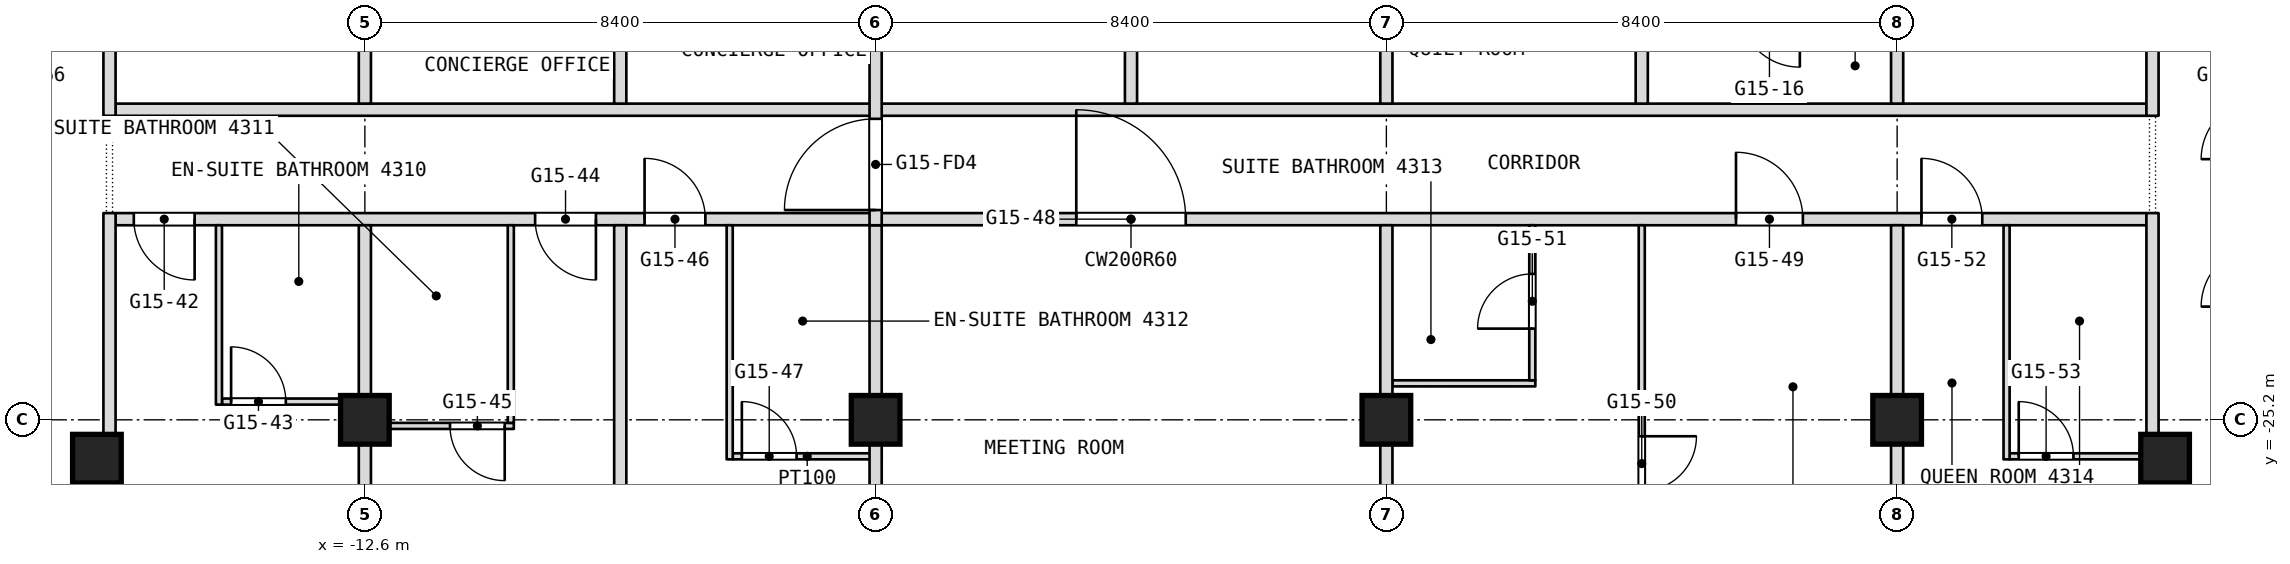
"""IFC4 building model, lengths in metres.
Left out: names, types, materials, properties, quantities, classifications, styles, units other than length and angle.
Written with IfcOpenShell. Run it as: python <this file> out.ifc"""

import sys

from ifc_helpers import new_model, si_unit, direction, frame, frame_2d, origin, origin_2d, place, context, subcontext, project, spatial, rectangle, extrude, element, fill, save


model = new_model("IFC4")
c1 = context("Model", 3, precision=1e-05, world=origin(), true_north=direction((0.0, 1.0)))
c2 = subcontext(c1, "Body", "Model", "MODEL_VIEW")
j1 = project(units=[si_unit("LENGTHUNIT", "METRE"), si_unit("PLANEANGLEUNIT", "RADIAN")], contexts=[c1])
p1 = place(None, origin())
s1 = spatial("IfcSite", under=j1, at=p1, CompositionType="ELEMENT")
p2 = place(p1, origin())
s2 = spatial("IfcBuilding", under=s1, at=p2, CompositionType="ELEMENT")
p3 = place(p2, frame((0.0, 0.0, 191.3)))
s3 = spatial("IfcBuildingStorey", under=s2, at=p3, CompositionType="ELEMENT", Elevation=191.3)
for number, where, z_axis, x_axis in (
    (1, (-12.6, -25.2, 0.0), (0.0, 0.0, 1.0), (1.0, 0.0, 0.0)),
    (2, (-4.2, -25.2, 0.0), (0.0, 0.0, 1.0), (1.0, 0.0, 0.0)),
    (3, (4.2, -25.2, 0.0), (0.0, 0.0, 1.0), (1.0, 0.0, 0.0)),
    (4, (12.6, -25.2, 0.0), (0.0, 0.0, 1.0), (1.0, 0.0, 0.0)),
    (5, (17.007, -25.839, 0.0), (0.0, 0.0, 1.0), (1.0, 0.0, 0.0)),
    (6, (-17.007, -25.839, 0.0), (0.0, 0.0, 1.0), (1.0, 0.0, 0.0)),
):
    element("IfcColumn", number, at=place(p3, frame(where, z_axis=z_axis, x_axis=x_axis)), inside=s3, PredefinedType="COLUMN", context=c2, shape_type="SweptSolid", body=[
        extrude(rectangle(XDim=0.8, YDim=0.8, at=origin_2d()), origin(), (0.0, 0.0, 1.0), 3.6),
    ])
p4 = place(p3, frame((-6.55, -25.8, 0.0), z_axis=(0.0, 0.0, 1.0), x_axis=(1.0, 0.0, 0.0)))
e7 = element("IfcWall", 7, at=p4, inside=s3, PredefinedType="PARTITIONING", context=c2, shape_type="SweptSolid", body=[
    extrude(rectangle(XDim=2.45, YDim=0.1, at=frame_2d((1.225, 0.0))), origin(), (0.0, 0.0, 1.0), 3.34),
])
p5 = place(p4, frame((0.15, 0.0, 0.0)))
e8 = element("IfcOpeningElement", 8, at=p5, cuts=e7, PredefinedType="OPENING", context=c2, shape_type="SweptSolid", body=[
    extrude(rectangle(XDim=0.9, YDim=2.1, at=frame_2d((0.45, 1.05))), frame((0.0, 0.05, 0.0), z_axis=(0.0, -1.0, 0.0), x_axis=(1.0, 0.0, 0.0)), (0.0, 0.0, 1.0), 0.1),
])
p6 = place(p3, frame((14.45, -25.8, 0.0), z_axis=(0.0, 0.0, 1.0), x_axis=(1.0, 0.0, 0.0)))
e9 = element("IfcWall", 9, at=p6, inside=s3, PredefinedType="PARTITIONING", context=c2, shape_type="SweptSolid", body=[
    extrude(rectangle(XDim=2.25, YDim=0.1, at=frame_2d((1.125, 0.0))), origin(), (0.0, 0.0, 1.0), 3.34),
])
p7 = place(p6, frame((0.15, 0.0, 0.0)))
e10 = element("IfcOpeningElement", 10, at=p7, cuts=e9, PredefinedType="OPENING", context=c2, shape_type="SweptSolid", body=[
    extrude(rectangle(XDim=0.9, YDim=2.1, at=frame_2d((0.45, 1.05))), frame((0.0, 0.05, 0.0), z_axis=(0.0, -1.0, 0.0), x_axis=(1.0, 0.0, 0.0)), (0.0, 0.0, 1.0), 0.1),
])
p8 = place(p3, frame((-12.5, -25.3, 0.0), z_axis=(0.0, 0.0, 1.0), x_axis=(1.0, 0.0, 0.0)))
e11 = element("IfcWall", 11, at=p8, inside=s3, PredefinedType="PARTITIONING", context=c2, shape_type="SweptSolid", body=[
    extrude(rectangle(XDim=2.35, YDim=0.1, at=frame_2d((1.175, 0.0))), origin(), (0.0, 0.0, 1.0), 2.94),
])
p9 = place(p8, frame((1.3, 0.0, 0.0)))
e12 = element("IfcOpeningElement", 12, at=p9, cuts=e11, PredefinedType="OPENING", context=c2, shape_type="SweptSolid", body=[
    extrude(rectangle(XDim=0.9, YDim=2.1, at=frame_2d((0.45, 1.05))), frame((0.0, 0.05, 0.0), z_axis=(0.0, -1.0, 0.0), x_axis=(1.0, 0.0, 0.0)), (0.0, 0.0, 1.0), 0.1),
])
p10 = place(p3, frame((-14.95, -24.9, 0.0), z_axis=(0.0, 0.0, 1.0), x_axis=(1.0, 0.0, 0.0)))
e13 = element("IfcWall", 13, at=p10, inside=s3, PredefinedType="PARTITIONING", context=c2, shape_type="SweptSolid", body=[
    extrude(rectangle(XDim=2.45, YDim=0.1, at=frame_2d((1.225, 0.0))), origin(), (0.0, 0.0, 1.0), 3.34),
])
p11 = place(p10, frame((0.15, 0.0, 0.0)))
e14 = element("IfcOpeningElement", 14, at=p11, cuts=e13, PredefinedType="OPENING", context=c2, shape_type="SweptSolid", body=[
    extrude(rectangle(XDim=0.9, YDim=2.1, at=frame_2d((0.45, 1.05))), frame((0.0, 0.05, 0.0), z_axis=(0.0, -1.0, 0.0), x_axis=(1.0, 0.0, 0.0)), (0.0, 0.0, 1.0), 0.1),
])
p12 = place(p3, frame((4.3, -24.6, 0.0), z_axis=(0.0, 0.0, 1.0), x_axis=(1.0, 0.0, 0.0)))
e15 = element("IfcWall", 15, at=p12, inside=s3, PredefinedType="PARTITIONING", context=c2, shape_type="SweptSolid", body=[
    extrude(rectangle(XDim=2.35, YDim=0.1, at=frame_2d((1.175, 0.0))), origin(), (0.0, 0.0, 1.0), 3.34),
])
p13 = place(p3, frame((-16.7, -21.9, 0.0), z_axis=(0.0, 0.0, 1.0), x_axis=(1.0, 0.0, 0.0)))
e16 = element("IfcWall", 16, at=p13, inside=s3, PredefinedType="PARTITIONING", context=c2, shape_type="SweptSolid", body=[
    extrude(rectangle(XDim=33.4, YDim=0.2, at=frame_2d((16.7, 0.0))), origin(), (0.0, 0.0, 1.0), 3.34),
])
p14 = place(p13, frame((0.3, 0.0, 0.0)))
e17 = element("IfcOpeningElement", 17, at=p14, cuts=e16, PredefinedType="OPENING", context=c2, shape_type="SweptSolid", body=[
    extrude(rectangle(XDim=1.0, YDim=2.1, at=frame_2d((0.5, 1.05))), frame((0.0, 0.1, 0.0), z_axis=(0.0, -1.0, 0.0), x_axis=(1.0, 0.0, 0.0)), (0.0, 0.0, 1.0), 0.2),
])
p15 = place(p13, frame((6.9, 0.0, 0.0)))
e18 = element("IfcOpeningElement", 18, at=p15, cuts=e16, PredefinedType="OPENING", context=c2, shape_type="SweptSolid", body=[
    extrude(rectangle(XDim=1.0, YDim=2.1, at=frame_2d((0.5, 1.05))), frame((0.0, 0.1, 0.0), z_axis=(0.0, -1.0, 0.0), x_axis=(1.0, 0.0, 0.0)), (0.0, 0.0, 1.0), 0.2),
])
p16 = place(p13, frame((8.7, 0.0, 0.0)))
e19 = element("IfcOpeningElement", 19, at=p16, cuts=e16, PredefinedType="OPENING", context=c2, shape_type="SweptSolid", body=[
    extrude(rectangle(XDim=1.0, YDim=2.1, at=frame_2d((0.5, 1.05))), frame((0.0, 0.1, 0.0), z_axis=(0.0, -1.0, 0.0), x_axis=(1.0, 0.0, 0.0)), (0.0, 0.0, 1.0), 0.2),
])
p17 = place(p13, frame((15.8, 0.0, 0.0)))
e20 = element("IfcOpeningElement", 20, at=p17, cuts=e16, PredefinedType="OPENING", context=c2, shape_type="SweptSolid", body=[
    extrude(rectangle(XDim=1.8, YDim=2.1, at=frame_2d((0.9, 1.05))), frame((0.0, 0.1, 0.0), z_axis=(0.0, -1.0, 0.0), x_axis=(1.0, 0.0, 0.0)), (0.0, 0.0, 1.0), 0.2),
])
p18 = place(p13, frame((26.65, 0.0, 0.0)))
e21 = element("IfcOpeningElement", 21, at=p18, cuts=e16, PredefinedType="OPENING", context=c2, shape_type="SweptSolid", body=[
    extrude(rectangle(XDim=1.1, YDim=2.1, at=frame_2d((0.55, 1.05))), frame((0.0, 0.1, 0.0), z_axis=(0.0, -1.0, 0.0), x_axis=(1.0, 0.0, 0.0)), (0.0, 0.0, 1.0), 0.2),
])
p19 = place(p13, frame((29.7, 0.0, 0.0)))
e22 = element("IfcOpeningElement", 22, at=p19, cuts=e16, PredefinedType="OPENING", context=c2, shape_type="SweptSolid", body=[
    extrude(rectangle(XDim=1.0, YDim=2.1, at=frame_2d((0.5, 1.05))), frame((0.0, 0.1, 0.0), z_axis=(0.0, -1.0, 0.0), x_axis=(1.0, 0.0, 0.0)), (0.0, 0.0, 1.0), 0.2),
])
p20 = place(p3, frame((-16.7, -20.1, 0.0), z_axis=(0.0, 0.0, 1.0), x_axis=(1.0, 0.0, 0.0)))
e23 = element("IfcWall", 23, at=p20, inside=s3, PredefinedType="PARTITIONING", context=c2, shape_type="SweptSolid", body=[
    extrude(rectangle(XDim=33.4, YDim=0.2, at=frame_2d((16.7, 0.0))), origin(), (0.0, 0.0, 1.0), 3.34),
])
p21 = place(p3, frame((16.8, -27.229, 0.0), z_axis=(0.0, 0.0, 1.0), x_axis=(0.0, 1.0, 0.0)))
e24 = element("IfcWall", 24, at=p21, inside=s3, PredefinedType="PARTITIONING", context=c2, shape_type="SweptSolid", body=[
    extrude(rectangle(XDim=5.429, YDim=0.2, at=frame_2d((2.714, 0.0))), origin(), (0.0, 0.0, 1.0), 3.34),
])
p22 = place(p3, frame((16.8, -20.2, 0.0), z_axis=(0.0, 0.0, 1.0), x_axis=(0.0, 1.0, 0.0)))
e25 = element("IfcWall", 25, at=p22, inside=s3, PredefinedType="PARTITIONING", context=c2, shape_type="SweptSolid", body=[
    extrude(rectangle(XDim=6.8, YDim=0.2, at=frame_2d((3.4, 0.0))), origin(), (0.0, 0.0, 1.0), 3.34),
])
p23 = place(p3, frame((14.4, -25.85, 0.0), z_axis=(0.0, 0.0, 1.0), x_axis=(0.0, 1.0, 0.0)))
e26 = element("IfcWall", 26, at=p23, inside=s3, PredefinedType="PARTITIONING", context=c2, shape_type="SweptSolid", body=[
    extrude(rectangle(XDim=3.85, YDim=0.1, at=frame_2d((1.925, 0.0))), origin(), (0.0, 0.0, 1.0), 3.34),
])
p24 = place(p3, frame((12.6, -28.343, 0.0), z_axis=(0.0, 0.0, 1.0), x_axis=(0.0, 1.0, 0.0)))
e27 = element("IfcWall", 27, at=p24, inside=s3, PredefinedType="PARTITIONING", context=c2, shape_type="SweptSolid", body=[
    extrude(rectangle(XDim=6.343, YDim=0.2, at=frame_2d((3.171, 0.0))), origin(), (0.0, 0.0, 1.0), 3.34),
])
p25 = place(p3, frame((12.6, -20.0, 0.0), z_axis=(0.0, 0.0, 1.0), x_axis=(0.0, 1.0, 0.0)))
e28 = element("IfcWall", 28, at=p25, inside=s3, PredefinedType="PARTITIONING", context=c2, shape_type="SweptSolid", body=[
    extrude(rectangle(XDim=1.5, YDim=0.2, at=frame_2d((0.75, 0.0))), origin(), (0.0, 0.0, 1.0), 3.34),
])
p26 = place(p3, frame((8.4, -28.9, 0.0), z_axis=(0.0, 0.0, 1.0), x_axis=(0.0, 1.0, 0.0)))
e29 = element("IfcWall", 29, at=p26, inside=s3, PredefinedType="PARTITIONING", context=c2, shape_type="SweptSolid", body=[
    extrude(rectangle(XDim=6.9, YDim=0.1, at=frame_2d((3.45, 0.0))), origin(), (0.0, 0.0, 1.0), 3.34),
])
p27 = place(p26, frame((2.53, 0.0, 0.0)))
e30 = element("IfcOpeningElement", 30, at=p27, cuts=e29, PredefinedType="OPENING", context=c2, shape_type="SweptSolid", body=[
    extrude(rectangle(XDim=0.9, YDim=2.1, at=frame_2d((0.45, 1.05))), frame((0.0, 0.05, 0.0), z_axis=(0.0, -1.0, 0.0), x_axis=(1.0, 0.0, 0.0)), (0.0, 0.0, 1.0), 0.1),
])
p28 = place(p3, frame((8.4, -20.0, 0.0), z_axis=(0.0, 0.0, 1.0), x_axis=(0.0, 1.0, 0.0)))
e31 = element("IfcWall", 31, at=p28, inside=s3, PredefinedType="PARTITIONING", context=c2, shape_type="SweptSolid", body=[
    extrude(rectangle(XDim=1.5, YDim=0.2, at=frame_2d((0.75, 0.0))), origin(), (0.0, 0.0, 1.0), 3.34),
])
p29 = place(p3, frame((6.6, -24.55, 0.0), z_axis=(0.0, 0.0, 1.0), x_axis=(0.0, 1.0, 0.0)))
e32 = element("IfcWall", 32, at=p29, inside=s3, PredefinedType="PARTITIONING", context=c2, shape_type="SweptSolid", body=[
    extrude(rectangle(XDim=2.55, YDim=0.1, at=frame_2d((1.275, 0.0))), origin(), (0.0, 0.0, 1.0), 3.34),
])
p30 = place(p29, frame((0.85, 0.0, 0.0)))
e33 = element("IfcOpeningElement", 33, at=p30, cuts=e32, PredefinedType="OPENING", context=c2, shape_type="SweptSolid", body=[
    extrude(rectangle(XDim=0.9, YDim=2.1, at=frame_2d((0.45, 1.05))), frame((0.0, 0.05, 0.0), z_axis=(0.0, -1.0, 0.0), x_axis=(1.0, 0.0, 0.0)), (0.0, 0.0, 1.0), 0.1),
])
p31 = place(p3, frame((4.2, -28.9, 0.0), z_axis=(0.0, 0.0, 1.0), x_axis=(0.0, 1.0, 0.0)))
e34 = element("IfcWall", 34, at=p31, inside=s3, PredefinedType="PARTITIONING", context=c2, shape_type="SweptSolid", body=[
    extrude(rectangle(XDim=6.9, YDim=0.2, at=frame_2d((3.45, 0.0))), origin(), (0.0, 0.0, 1.0), 3.34),
])
for number, where, z_axis, x_axis in (
    (35, (4.2, -20.0, 0.0), (0.0, 0.0, 1.0), (0.0, 1.0, 0.0)),
    (36, (0.0, -20.0, 0.0), (0.0, 0.0, 1.0), (0.0, 1.0, 0.0)),
):
    element("IfcWall", number, at=place(p3, frame(where, z_axis=z_axis, x_axis=x_axis)), inside=s3, PredefinedType="PARTITIONING", context=c2, shape_type="SweptSolid", body=[
        extrude(rectangle(XDim=6.4, YDim=0.2, at=frame_2d((3.2, 0.0))), origin(), (0.0, 0.0, 1.0), 3.34),
    ])
p32 = place(p3, frame((-4.2, -28.9, 0.0), z_axis=(0.0, 0.0, 1.0), x_axis=(0.0, 1.0, 0.0)))
e37 = element("IfcWall", 37, at=p32, inside=s3, PredefinedType="PARTITIONING", context=c2, shape_type="SweptSolid", body=[
    extrude(rectangle(XDim=6.9, YDim=0.2, at=frame_2d((3.45, 0.0))), origin(), (0.0, 0.0, 1.0), 3.34),
])
p33 = place(p3, frame((-4.2, -22.0, 0.0), z_axis=(0.0, 0.0, 1.0), x_axis=(0.0, 1.0, 0.0)))
e38 = element("IfcWall", 38, at=p33, inside=s3, PredefinedType="PARTITIONING", context=c2, shape_type="SweptSolid", body=[
    extrude(rectangle(XDim=8.4, YDim=0.2, at=frame_2d((4.2, 0.0))), origin(), (0.0, 0.0, 1.0), 3.34),
])
p34 = place(p33, frame((0.25, 0.0, 0.0)))
e39 = element("IfcOpeningElement", 39, at=p34, cuts=e38, PredefinedType="OPENING", context=c2, shape_type="SweptSolid", body=[
    extrude(rectangle(XDim=1.5, YDim=2.1, at=frame_2d((0.75, 1.05))), frame((0.0, 0.1, 0.0), z_axis=(0.0, -1.0, 0.0), x_axis=(1.0, 0.0, 0.0)), (0.0, 0.0, 1.0), 0.2),
])
p35 = place(p3, frame((-6.6, -25.85, 0.0), z_axis=(0.0, 0.0, 1.0), x_axis=(0.0, 1.0, 0.0)))
e40 = element("IfcWall", 40, at=p35, inside=s3, PredefinedType="PARTITIONING", context=c2, shape_type="SweptSolid", body=[
    extrude(rectangle(XDim=3.85, YDim=0.1, at=frame_2d((1.925, 0.0))), origin(), (0.0, 0.0, 1.0), 3.34),
])
p36 = place(p3, frame((-8.4, -28.9, 0.0), z_axis=(0.0, 0.0, 1.0), x_axis=(0.0, 1.0, 0.0)))
e41 = element("IfcWall", 41, at=p36, inside=s3, PredefinedType="PARTITIONING", context=c2, shape_type="SweptSolid", body=[
    extrude(rectangle(XDim=6.9, YDim=0.2, at=frame_2d((3.45, 0.0))), origin(), (0.0, 0.0, 1.0), 3.34),
])
p37 = place(p3, frame((-8.4, -20.0, 0.0), z_axis=(0.0, 0.0, 1.0), x_axis=(0.0, 1.0, 0.0)))
e42 = element("IfcWall", 42, at=p37, inside=s3, PredefinedType="PARTITIONING", context=c2, shape_type="SweptSolid", body=[
    extrude(rectangle(XDim=1.5, YDim=0.2, at=frame_2d((0.75, 0.0))), origin(), (0.0, 0.0, 1.0), 3.34),
])
p38 = place(p3, frame((-10.2, -25.25, 0.0), z_axis=(0.0, 0.0, 1.0), x_axis=(0.0, 1.0, 0.0)))
e43 = element("IfcWall", 43, at=p38, inside=s3, PredefinedType="PARTITIONING", context=c2, shape_type="SweptSolid", body=[
    extrude(rectangle(XDim=3.25, YDim=0.1, at=frame_2d((1.625, 0.0))), origin(), (0.0, 0.0, 1.0), 3.34),
])
p39 = place(p3, frame((-12.6, -28.343, 0.0), z_axis=(0.0, 0.0, 1.0), x_axis=(0.0, 1.0, 0.0)))
e44 = element("IfcWall", 44, at=p39, inside=s3, PredefinedType="PARTITIONING", context=c2, shape_type="SweptSolid", body=[
    extrude(rectangle(XDim=6.343, YDim=0.2, at=frame_2d((3.171, 0.0))), origin(), (0.0, 0.0, 1.0), 3.34),
])
p40 = place(p3, frame((-12.6, -20.0, 0.0), z_axis=(0.0, 0.0, 1.0), x_axis=(0.0, 1.0, 0.0)))
e45 = element("IfcWall", 45, at=p40, inside=s3, PredefinedType="PARTITIONING", context=c2, shape_type="SweptSolid", body=[
    extrude(rectangle(XDim=1.5, YDim=0.2, at=frame_2d((0.75, 0.0))), origin(), (0.0, 0.0, 1.0), 3.34),
])
p41 = place(p3, frame((-15.0, -24.95, 0.0), z_axis=(0.0, 0.0, 1.0), x_axis=(0.0, 1.0, 0.0)))
e46 = element("IfcWall", 46, at=p41, inside=s3, PredefinedType="PARTITIONING", context=c2, shape_type="SweptSolid", body=[
    extrude(rectangle(XDim=2.95, YDim=0.1, at=frame_2d((1.475, 0.0))), origin(), (0.0, 0.0, 1.0), 3.34),
])
p42 = place(p3, frame((-16.8, -27.229, 0.0), z_axis=(0.0, 0.0, 1.0), x_axis=(0.0, 1.0, 0.0)))
e47 = element("IfcWall", 47, at=p42, inside=s3, PredefinedType="PARTITIONING", context=c2, shape_type="SweptSolid", body=[
    extrude(rectangle(XDim=5.429, YDim=0.2, at=frame_2d((2.714, 0.0))), origin(), (0.0, 0.0, 1.0), 3.34),
])
p43 = place(p3, frame((-16.8, -20.2, 0.0), z_axis=(0.0, 0.0, 1.0), x_axis=(0.0, 1.0, 0.0)))
e48 = element("IfcWall", 48, at=p43, inside=s3, PredefinedType="PARTITIONING", context=c2, shape_type="SweptSolid", body=[
    extrude(rectangle(XDim=6.8, YDim=0.2, at=frame_2d((3.4, 0.0))), origin(), (0.0, 0.0, 1.0), 3.34),
])
p44 = place(p5, origin())
e49 = element("IfcDoor", 49, at=p44, inside=s3, OperationType="SINGLE_SWING_LEFT", PredefinedType="DOOR", context=c2, shape_type="SweptSolid", body=[
    extrude(rectangle(XDim=0.9, YDim=2.1, at=frame_2d((0.45, 1.05))), frame((0.0, 0.025, 0.0), z_axis=(0.0, -1.0, 0.0), x_axis=(1.0, 0.0, 0.0)), (0.0, 0.0, 1.0), 0.05),
])
fill(e8, e49)
p45 = place(p7, origin())
e50 = element("IfcDoor", 50, at=p45, inside=s3, OperationType="SINGLE_SWING_LEFT", PredefinedType="DOOR", context=c2, shape_type="SweptSolid", body=[
    extrude(rectangle(XDim=0.9, YDim=2.1, at=frame_2d((0.45, 1.05))), frame((0.0, 0.025, 0.0), z_axis=(0.0, -1.0, 0.0), x_axis=(1.0, 0.0, 0.0)), (0.0, 0.0, 1.0), 0.05),
])
fill(e10, e50)
p46 = place(p9, origin())
e51 = element("IfcDoor", 51, at=p46, inside=s3, OperationType="SINGLE_SWING_RIGHT", PredefinedType="DOOR", context=c2, shape_type="SweptSolid", body=[
    extrude(rectangle(XDim=0.9, YDim=2.1, at=frame_2d((0.45, 1.05))), frame((0.0, 0.025, 0.0), z_axis=(0.0, -1.0, 0.0), x_axis=(1.0, 0.0, 0.0)), (0.0, 0.0, 1.0), 0.05),
])
fill(e12, e51)
p47 = place(p11, origin())
e52 = element("IfcDoor", 52, at=p47, inside=s3, OperationType="SINGLE_SWING_LEFT", PredefinedType="DOOR", context=c2, shape_type="SweptSolid", body=[
    extrude(rectangle(XDim=0.9, YDim=2.1, at=frame_2d((0.45, 1.05))), frame((0.0, 0.025, 0.0), z_axis=(0.0, -1.0, 0.0), x_axis=(1.0, 0.0, 0.0)), (0.0, 0.0, 1.0), 0.05),
])
fill(e14, e52)
p48 = place(p14, origin())
e53 = element("IfcDoor", 53, at=p48, inside=s3, OperationType="SINGLE_SWING_RIGHT", PredefinedType="DOOR", context=c2, shape_type="SweptSolid", body=[
    extrude(rectangle(XDim=1.0, YDim=2.1, at=frame_2d((0.5, 1.05))), frame((0.0, 0.025, 0.0), z_axis=(0.0, -1.0, 0.0), x_axis=(1.0, 0.0, 0.0)), (0.0, 0.0, 1.0), 0.05),
])
fill(e17, e53)
p49 = place(p15, origin())
e54 = element("IfcDoor", 54, at=p49, inside=s3, OperationType="SINGLE_SWING_RIGHT", PredefinedType="DOOR", context=c2, shape_type="SweptSolid", body=[
    extrude(rectangle(XDim=1.0, YDim=2.1, at=frame_2d((0.5, 1.05))), frame((0.0, 0.025, 0.0), z_axis=(0.0, -1.0, 0.0), x_axis=(1.0, 0.0, 0.0)), (0.0, 0.0, 1.0), 0.05),
])
fill(e18, e54)
p50 = place(p16, origin())
e55 = element("IfcDoor", 55, at=p50, inside=s3, OperationType="SINGLE_SWING_RIGHT", PredefinedType="DOOR", context=c2, shape_type="SweptSolid", body=[
    extrude(rectangle(XDim=1.0, YDim=2.1, at=frame_2d((0.5, 1.05))), frame((0.0, 0.025, 0.0), z_axis=(0.0, -1.0, 0.0), x_axis=(1.0, 0.0, 0.0)), (0.0, 0.0, 1.0), 0.05),
])
fill(e19, e55)
p51 = place(p17, origin())
e56 = element("IfcDoor", 56, at=p51, inside=s3, OperationType="DOUBLE_DOOR_SINGLE_SWING", PredefinedType="DOOR", context=c2, shape_type="SweptSolid", body=[
    extrude(rectangle(XDim=1.8, YDim=2.1, at=frame_2d((0.9, 1.05))), frame((0.0, 0.025, 0.0), z_axis=(0.0, -1.0, 0.0), x_axis=(1.0, 0.0, 0.0)), (0.0, 0.0, 1.0), 0.05),
])
fill(e20, e56)
p52 = place(p18, origin())
e57 = element("IfcDoor", 57, at=p52, inside=s3, OperationType="SINGLE_SWING_LEFT", PredefinedType="DOOR", context=c2, shape_type="SweptSolid", body=[
    extrude(rectangle(XDim=1.1, YDim=2.1, at=frame_2d((0.55, 1.05))), frame((0.0, 0.025, 0.0), z_axis=(0.0, -1.0, 0.0), x_axis=(1.0, 0.0, 0.0)), (0.0, 0.0, 1.0), 0.05),
])
fill(e21, e57)
p53 = place(p19, origin())
e58 = element("IfcDoor", 58, at=p53, inside=s3, OperationType="SINGLE_SWING_RIGHT", PredefinedType="DOOR", context=c2, shape_type="SweptSolid", body=[
    extrude(rectangle(XDim=1.0, YDim=2.1, at=frame_2d((0.5, 1.05))), frame((0.0, 0.025, 0.0), z_axis=(0.0, -1.0, 0.0), x_axis=(1.0, 0.0, 0.0)), (0.0, 0.0, 1.0), 0.05),
])
fill(e22, e58)
p54 = place(p27, origin())
e59 = element("IfcDoor", 59, at=p54, inside=s3, OperationType="SINGLE_SWING_LEFT", PredefinedType="DOOR", context=c2, shape_type="SweptSolid", body=[
    extrude(rectangle(XDim=0.9, YDim=2.1, at=frame_2d((0.45, 1.05))), frame((0.0, 0.025, 0.0), z_axis=(0.0, -1.0, 0.0), x_axis=(1.0, 0.0, 0.0)), (0.0, 0.0, 1.0), 0.05),
])
fill(e30, e59)
p55 = place(p30, origin())
e60 = element("IfcDoor", 60, at=p55, inside=s3, OperationType="SINGLE_SWING_RIGHT", PredefinedType="DOOR", context=c2, shape_type="SweptSolid", body=[
    extrude(rectangle(XDim=0.9, YDim=2.1, at=frame_2d((0.45, 1.05))), frame((0.0, 0.025, 0.0), z_axis=(0.0, -1.0, 0.0), x_axis=(1.0, 0.0, 0.0)), (0.0, 0.0, 1.0), 0.05),
])
fill(e33, e60)
p56 = place(p34, origin())
e61 = element("IfcDoor", 61, at=p56, inside=s3, OperationType="DOUBLE_DOOR_DOUBLE_SWING", PredefinedType="DOOR", context=c2, shape_type="SweptSolid", body=[
    extrude(rectangle(XDim=1.5, YDim=2.1, at=frame_2d((0.75, 1.05))), frame((0.0, 0.025, 0.0), z_axis=(0.0, -1.0, 0.0), x_axis=(1.0, 0.0, 0.0)), (0.0, 0.0, 1.0), 0.05),
])
fill(e39, e61)
save(model, sys.argv[1])
